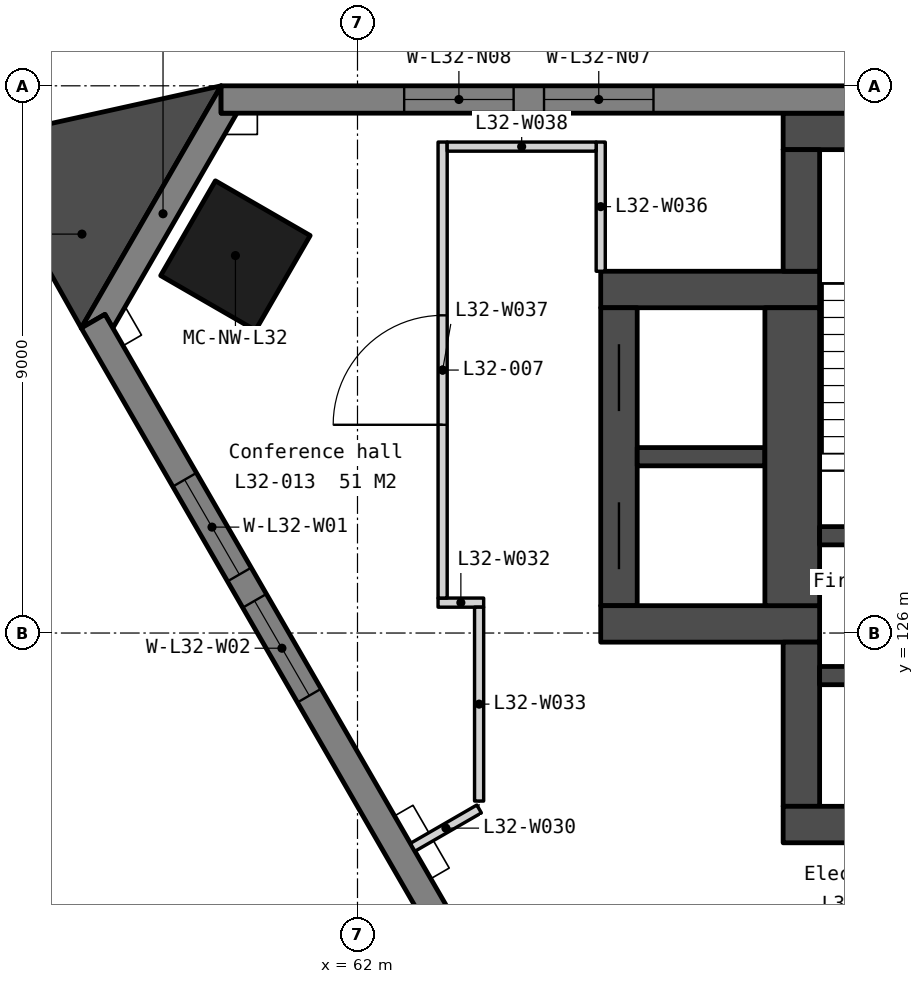
"""IFC4 building model, lengths in metres.
Left out: names, types, materials, properties, quantities, classifications, styles, units other than length and angle.
Written with IfcOpenShell. Run it as: python <this file> out.ifc"""

import sys

from ifc_helpers import new_model, si_unit, direction, frame, frame_2d, origin, origin_2d, place, context, subcontext, project, spatial, polyline, rectangle, outline, extrude, element, fill, save


model = new_model("IFC4")
c1 = context("Model", 3, precision=1e-05, world=origin(), true_north=direction((0.0, 1.0)))
c2 = subcontext(c1, "Body", "Model", "MODEL_VIEW")
j1 = project(units=[si_unit("LENGTHUNIT", "METRE"), si_unit("PLANEANGLEUNIT", "RADIAN")], contexts=[c1])
p1 = place(None, origin())
s1 = spatial("IfcSite", under=j1, at=p1, CompositionType="ELEMENT")
p2 = place(p1, origin())
s2 = spatial("IfcBuilding", under=s1, at=p2, CompositionType="ELEMENT")
p3 = place(p2, frame((0.0, 0.0, 128.6)))
s3 = spatial("IfcBuildingStorey", under=s2, at=p3, CompositionType="ELEMENT", Elevation=128.6)
p4 = place(p3, frame((59.993, 132.208, 0.0), z_axis=(0.0, 0.0, 1.0), x_axis=(-0.5, -0.866025403784, 0.0)))
e1 = element("IfcColumn", 1, at=p4, inside=s3, PredefinedType="COLUMN", context=c2, shape_type="SweptSolid", body=[
    extrude(rectangle(XDim=1.8, YDim=1.8, at=origin_2d()), origin(), (0.0, 0.0, 1.0), 3.9),
])
p5 = place(p3, frame((66.0, 131.65, 0.0), z_axis=(0.0, 0.0, 1.0), x_axis=(1.0, 0.0, 0.0)))
e2 = element("IfcWall", 2, at=p5, inside=s3, PredefinedType="SOLIDWALL", context=c2, shape_type="SweptSolid", body=[
    extrude(rectangle(XDim=3.6, YDim=0.6, at=frame_2d((1.8, 0.0))), origin(), (0.0, 0.0, 1.0), 3.75),
])
p6 = place(p3, frame((66.3, 131.35, 0.0), z_axis=(0.0, 0.0, 1.0), x_axis=(0.0, -1.0, 0.0)))
e3 = element("IfcWall", 3, at=p6, inside=s3, PredefinedType="SOLIDWALL", context=c2, shape_type="SweptSolid", body=[
    extrude(rectangle(XDim=4.9, YDim=0.6, at=frame_2d((2.45, 0.0))), origin(), (0.0, 0.0, 1.0), 3.75),
])
p7 = place(p6, frame((0.6, 0.0, 0.0)))
e4 = element("IfcOpeningElement", 4, at=p7, cuts=e3, PredefinedType="OPENING", context=c2, shape_type="SweptSolid", body=[
    extrude(rectangle(XDim=1.1, YDim=2.1, at=frame_2d((0.55, 1.05))), frame((0.0, 0.31, 0.0), z_axis=(0.0, -1.0, 0.0), x_axis=(1.0, 0.0, 0.0)), (0.0, 0.0, 1.0), 0.62),
])
p8 = place(p6, frame((3.2, 0.0, 0.0)))
e5 = element("IfcOpeningElement", 5, at=p8, cuts=e3, PredefinedType="OPENING", context=c2, shape_type="SweptSolid", body=[
    extrude(rectangle(XDim=1.1, YDim=2.1, at=frame_2d((0.55, 1.05))), frame((0.0, 0.31, 0.0), z_axis=(0.0, -1.0, 0.0), x_axis=(1.0, 0.0, 0.0)), (0.0, 0.0, 1.0), 0.62),
])
p9 = place(p3, frame((66.0, 126.15, 0.0), z_axis=(0.0, 0.0, 1.0), x_axis=(1.0, 0.0, 0.0)))
e6 = element("IfcWall", 6, at=p9, inside=s3, PredefinedType="SOLIDWALL", context=c2, shape_type="SweptSolid", body=[
    extrude(rectangle(XDim=3.6, YDim=0.6, at=frame_2d((1.8, 0.0))), origin(), (0.0, 0.0, 1.0), 3.75),
])
p10 = place(p3, frame((66.6, 128.9, 0.0), z_axis=(0.0, 0.0, 1.0), x_axis=(1.0, 0.0, 0.0)))
e7 = element("IfcWall", 7, at=p10, inside=s3, PredefinedType="SOLIDWALL", context=c2, shape_type="SweptSolid", body=[
    extrude(rectangle(XDim=2.1, YDim=0.3, at=frame_2d((1.05, 0.0))), origin(), (0.0, 0.0, 1.0), 3.75),
])
p11 = place(p3, frame((69.15, 131.35, 0.0), z_axis=(0.0, 0.0, 1.0), x_axis=(0.0, -1.0, 0.0)))
e8 = element("IfcWall", 8, at=p11, inside=s3, PredefinedType="SOLIDWALL", context=c2, shape_type="SweptSolid", body=[
    extrude(rectangle(XDim=4.9, YDim=0.9, at=frame_2d((2.45, 0.0))), origin(), (0.0, 0.0, 1.0), 3.75),
])
p12 = place(p3, frame((69.0, 134.25, 0.0), z_axis=(0.0, 0.0, 1.0), x_axis=(1.0, 0.0, 0.0)))
e9 = element("IfcWall", 9, at=p12, inside=s3, PredefinedType="SOLIDWALL", context=c2, shape_type="SweptSolid", body=[
    extrude(rectangle(XDim=22.0, YDim=0.6, at=frame_2d((11.0, 0.0))), origin(), (0.0, 0.0, 1.0), 3.75),
])
p13 = place(p3, frame((69.3, 133.95, 0.0), z_axis=(0.0, 0.0, 1.0), x_axis=(0.0, -1.0, 0.0)))
e10 = element("IfcWall", 10, at=p13, inside=s3, PredefinedType="SOLIDWALL", context=c2, shape_type="SweptSolid", body=[
    extrude(rectangle(XDim=2.0, YDim=0.6, at=frame_2d((1.0, 0.0))), origin(), (0.0, 0.0, 1.0), 3.75),
])
p14 = place(p3, frame((69.3, 125.85, 0.0), z_axis=(0.0, 0.0, 1.0), x_axis=(0.0, -1.0, 0.0)))
e11 = element("IfcWall", 11, at=p14, inside=s3, PredefinedType="SOLIDWALL", context=c2, shape_type="SweptSolid", body=[
    extrude(rectangle(XDim=2.7, YDim=0.6, at=frame_2d((1.35, 0.0))), origin(), (0.0, 0.0, 1.0), 3.75),
])
p15 = place(p3, frame((69.0, 122.85, 0.0), z_axis=(0.0, 0.0, 1.0), x_axis=(1.0, 0.0, 0.0)))
e12 = element("IfcWall", 12, at=p15, inside=s3, PredefinedType="SOLIDWALL", context=c2, shape_type="SweptSolid", body=[
    extrude(rectangle(XDim=22.0, YDim=0.6, at=frame_2d((11.0, 0.0))), origin(), (0.0, 0.0, 1.0), 3.75),
])
p16 = place(p15, frame((16.375, 0.0, 0.0)))
e13 = element("IfcOpeningElement", 13, at=p16, cuts=e12, PredefinedType="OPENING", context=c2, shape_type="SweptSolid", body=[
    extrude(rectangle(XDim=1.8, YDim=2.1, at=frame_2d((0.9, 1.05))), frame((0.0, 0.31, 0.0), z_axis=(0.0, -1.0, 0.0), x_axis=(1.0, 0.0, 0.0)), (0.0, 0.0, 1.0), 0.62),
])
p17 = place(p15, frame((3.825, 0.0, 0.0)))
e14 = element("IfcOpeningElement", 14, at=p17, cuts=e12, PredefinedType="OPENING", context=c2, shape_type="SweptSolid", body=[
    extrude(rectangle(XDim=1.8, YDim=2.1, at=frame_2d((0.9, 1.05))), frame((0.0, 0.31, 0.0), z_axis=(0.0, -1.0, 0.0), x_axis=(1.0, 0.0, 0.0)), (0.0, 0.0, 1.0), 0.62),
])
p18 = place(p15, frame((12.85, 0.0, 0.0)))
e15 = element("IfcOpeningElement", 15, at=p18, cuts=e12, PredefinedType="OPENING", context=c2, shape_type="SweptSolid", body=[
    extrude(rectangle(XDim=1.5, YDim=2.1, at=frame_2d((0.75, 1.05))), frame((0.0, 0.31, 0.0), z_axis=(0.0, -1.0, 0.0), x_axis=(1.0, 0.0, 0.0)), (0.0, 0.0, 1.0), 0.62),
])
for number, where, z_axis, x_axis in (
    (16, (69.6, 127.6, 0.0), (0.0, 0.0, 1.0), (1.0, 0.0, 0.0)),
    (17, (69.6, 125.3, 0.0), (0.0, 0.0, 1.0), (1.0, 0.0, 0.0)),
):
    element("IfcWall", number, at=place(p3, frame(where, z_axis=z_axis, x_axis=x_axis)), inside=s3, PredefinedType="SOLIDWALL", context=c2, shape_type="SweptSolid", body=[
        extrude(rectangle(XDim=2.55, YDim=0.3, at=frame_2d((1.275, 0.0))), origin(), (0.0, 0.0, 1.0), 3.75),
    ])
p19 = place(p3, frame((0.0, 0.0, -0.45)))
e18 = element("IfcWall", 18, at=p19, inside=s3, PredefinedType="SOLIDWALL", context=c2, shape_type="SweptSolid", body=[
    extrude(outline(polyline([(59.757, 135.0), (59.757, 134.55), (60.017, 134.55), (57.977, 131.016), (57.847, 131.241), (57.457, 131.016), (59.757, 135.0)])), origin(), (0.0, 0.0, 1.0), 4.2),
])
p20 = place(p3, frame((100.243, 134.775, -0.45), z_axis=(0.0, 0.0, 1.0), x_axis=(-1.0, 0.0, 0.0)))
e19 = element("IfcWall", 19, at=p20, inside=s3, PredefinedType="SOLIDWALL", context=c2, shape_type="SweptSolid", body=[
    extrude(outline(polyline([(40.486, 0.0), (40.486, 4.2), (0.0, 4.2), (0.0, 0.0), (40.486, 0.0)])), frame((0.0, 0.225, 0.0), z_axis=(0.0, -1.0, 0.0), x_axis=(1.0, 0.0, 0.0)), (0.0, 0.0, 1.0), 0.45),
])
p21 = place(p20, frame((3.011, 0.0, 1.25)))
e20 = element("IfcOpeningElement", 20, at=p21, cuts=e19, PredefinedType="OPENING", context=c2, shape_type="SweptSolid", body=[
    extrude(rectangle(XDim=1.8, YDim=2.2, at=frame_2d((0.9, 1.1))), frame((0.0, 0.235, 0.0), z_axis=(0.0, -1.0, 0.0), x_axis=(1.0, 0.0, 0.0)), (0.0, 0.0, 1.0), 0.47),
])
p22 = place(p20, frame((5.311, 0.0, 1.25)))
e21 = element("IfcOpeningElement", 21, at=p22, cuts=e19, PredefinedType="OPENING", context=c2, shape_type="SweptSolid", body=[
    extrude(rectangle(XDim=1.8, YDim=2.2, at=frame_2d((0.9, 1.1))), frame((0.0, 0.235, 0.0), z_axis=(0.0, -1.0, 0.0), x_axis=(1.0, 0.0, 0.0)), (0.0, 0.0, 1.0), 0.47),
])
p23 = place(p20, frame((13.132, 0.0, 1.25)))
e22 = element("IfcOpeningElement", 22, at=p23, cuts=e19, PredefinedType="OPENING", context=c2, shape_type="SweptSolid", body=[
    extrude(rectangle(XDim=1.8, YDim=2.2, at=frame_2d((0.9, 1.1))), frame((0.0, 0.235, 0.0), z_axis=(0.0, -1.0, 0.0), x_axis=(1.0, 0.0, 0.0)), (0.0, 0.0, 1.0), 0.47),
])
p24 = place(p20, frame((15.432, 0.0, 1.25)))
e23 = element("IfcOpeningElement", 23, at=p24, cuts=e19, PredefinedType="OPENING", context=c2, shape_type="SweptSolid", body=[
    extrude(rectangle(XDim=1.8, YDim=2.2, at=frame_2d((0.9, 1.1))), frame((0.0, 0.235, 0.0), z_axis=(0.0, -1.0, 0.0), x_axis=(1.0, 0.0, 0.0)), (0.0, 0.0, 1.0), 0.47),
])
p25 = place(p20, frame((23.254, 0.0, 1.25)))
e24 = element("IfcOpeningElement", 24, at=p25, cuts=e19, PredefinedType="OPENING", context=c2, shape_type="SweptSolid", body=[
    extrude(rectangle(XDim=1.8, YDim=2.2, at=frame_2d((0.9, 1.1))), frame((0.0, 0.235, 0.0), z_axis=(0.0, -1.0, 0.0), x_axis=(1.0, 0.0, 0.0)), (0.0, 0.0, 1.0), 0.47),
])
p26 = place(p20, frame((25.554, 0.0, 1.25)))
e25 = element("IfcOpeningElement", 25, at=p26, cuts=e19, PredefinedType="OPENING", context=c2, shape_type="SweptSolid", body=[
    extrude(rectangle(XDim=1.8, YDim=2.2, at=frame_2d((0.9, 1.1))), frame((0.0, 0.235, 0.0), z_axis=(0.0, -1.0, 0.0), x_axis=(1.0, 0.0, 0.0)), (0.0, 0.0, 1.0), 0.47),
])
p27 = place(p20, frame((33.375, 0.0, 1.25)))
e26 = element("IfcOpeningElement", 26, at=p27, cuts=e19, PredefinedType="OPENING", context=c2, shape_type="SweptSolid", body=[
    extrude(rectangle(XDim=1.8, YDim=2.2, at=frame_2d((0.9, 1.1))), frame((0.0, 0.235, 0.0), z_axis=(0.0, -1.0, 0.0), x_axis=(1.0, 0.0, 0.0)), (0.0, 0.0, 1.0), 0.47),
])
p28 = place(p20, frame((35.675, 0.0, 1.25)))
e27 = element("IfcOpeningElement", 27, at=p28, cuts=e19, PredefinedType="OPENING", context=c2, shape_type="SweptSolid", body=[
    extrude(rectangle(XDim=1.8, YDim=2.2, at=frame_2d((0.9, 1.1))), frame((0.0, 0.235, 0.0), z_axis=(0.0, -1.0, 0.0), x_axis=(1.0, 0.0, 0.0)), (0.0, 0.0, 1.0), 0.47),
])
p29 = place(p3, frame((57.652, 131.129, -0.45), z_axis=(0.0, 0.0, 1.0), x_axis=(0.499997369791, -0.866026922331, 0.0)))
e28 = element("IfcWall", 28, at=p29, inside=s3, PredefinedType="SOLIDWALL", context=c2, shape_type="SweptSolid", body=[
    extrude(outline(polyline([(40.486, 0.0), (40.486, 4.2), (0.0, 4.2), (0.0, 0.0), (40.486, 0.0)])), frame((0.0, 0.225, 0.0), z_axis=(0.0, -1.0, 0.0), x_axis=(1.0, 0.0, 0.0)), (0.0, 0.0, 1.0), 0.45),
])
p30 = place(p29, frame((3.011, 0.0, 1.25)))
e29 = element("IfcOpeningElement", 29, at=p30, cuts=e28, PredefinedType="OPENING", context=c2, shape_type="SweptSolid", body=[
    extrude(rectangle(XDim=1.8, YDim=2.2, at=frame_2d((0.9, 1.1))), frame((0.0, 0.235, 0.0), z_axis=(0.0, -1.0, 0.0), x_axis=(1.0, 0.0, 0.0)), (0.0, 0.0, 1.0), 0.47),
])
p31 = place(p29, frame((5.311, 0.0, 1.25)))
e30 = element("IfcOpeningElement", 30, at=p31, cuts=e28, PredefinedType="OPENING", context=c2, shape_type="SweptSolid", body=[
    extrude(rectangle(XDim=1.8, YDim=2.2, at=frame_2d((0.9, 1.1))), frame((0.0, 0.235, 0.0), z_axis=(0.0, -1.0, 0.0), x_axis=(1.0, 0.0, 0.0)), (0.0, 0.0, 1.0), 0.47),
])
p32 = place(p29, frame((13.132, 0.0, 1.25)))
e31 = element("IfcOpeningElement", 31, at=p32, cuts=e28, PredefinedType="OPENING", context=c2, shape_type="SweptSolid", body=[
    extrude(rectangle(XDim=1.8, YDim=2.2, at=frame_2d((0.9, 1.1))), frame((0.0, 0.235, 0.0), z_axis=(0.0, -1.0, 0.0), x_axis=(1.0, 0.0, 0.0)), (0.0, 0.0, 1.0), 0.47),
])
p33 = place(p29, frame((15.432, 0.0, 1.25)))
e32 = element("IfcOpeningElement", 32, at=p33, cuts=e28, PredefinedType="OPENING", context=c2, shape_type="SweptSolid", body=[
    extrude(rectangle(XDim=1.8, YDim=2.2, at=frame_2d((0.9, 1.1))), frame((0.0, 0.235, 0.0), z_axis=(0.0, -1.0, 0.0), x_axis=(1.0, 0.0, 0.0)), (0.0, 0.0, 1.0), 0.47),
])
p34 = place(p29, frame((23.254, 0.0, 1.25)))
e33 = element("IfcOpeningElement", 33, at=p34, cuts=e28, PredefinedType="OPENING", context=c2, shape_type="SweptSolid", body=[
    extrude(rectangle(XDim=1.8, YDim=2.2, at=frame_2d((0.9, 1.1))), frame((0.0, 0.235, 0.0), z_axis=(0.0, -1.0, 0.0), x_axis=(1.0, 0.0, 0.0)), (0.0, 0.0, 1.0), 0.47),
])
p35 = place(p29, frame((25.554, 0.0, 1.25)))
e34 = element("IfcOpeningElement", 34, at=p35, cuts=e28, PredefinedType="OPENING", context=c2, shape_type="SweptSolid", body=[
    extrude(rectangle(XDim=1.8, YDim=2.2, at=frame_2d((0.9, 1.1))), frame((0.0, 0.235, 0.0), z_axis=(0.0, -1.0, 0.0), x_axis=(1.0, 0.0, 0.0)), (0.0, 0.0, 1.0), 0.47),
])
p36 = place(p29, frame((33.375, 0.0, 1.25)))
e35 = element("IfcOpeningElement", 35, at=p36, cuts=e28, PredefinedType="OPENING", context=c2, shape_type="SweptSolid", body=[
    extrude(rectangle(XDim=1.8, YDim=2.2, at=frame_2d((0.9, 1.1))), frame((0.0, 0.235, 0.0), z_axis=(0.0, -1.0, 0.0), x_axis=(1.0, 0.0, 0.0)), (0.0, 0.0, 1.0), 0.47),
])
p37 = place(p29, frame((35.675, 0.0, 1.25)))
e36 = element("IfcOpeningElement", 36, at=p37, cuts=e28, PredefinedType="OPENING", context=c2, shape_type="SweptSolid", body=[
    extrude(rectangle(XDim=1.8, YDim=2.2, at=frame_2d((0.9, 1.1))), frame((0.0, 0.235, 0.0), z_axis=(0.0, -1.0, 0.0), x_axis=(1.0, 0.0, 0.0)), (0.0, 0.0, 1.0), 0.47),
])
p38 = place(p3, frame((0.0, 0.0, -0.45)))
e37 = element("IfcWall", 37, at=p38, inside=s3, PredefinedType="SOLIDWALL", context=c2, shape_type="SweptSolid", body=[
    extrude(outline(polyline([(59.757, 135.0), (55.72, 134.106), (57.457, 131.016), (59.757, 135.0)])), origin(), (0.0, 0.0, 1.0), 4.2),
])
p39 = place(p3, frame((62.907, 122.476, 0.0), z_axis=(0.0, 0.0, 1.0), x_axis=(0.865995441363, 0.500051892845, 0.0)))
e38 = element("IfcWall", 38, at=p39, inside=s3, PredefinedType="PARTITIONING", context=c2, shape_type="SweptSolid", body=[
    extrude(rectangle(XDim=1.261, YDim=0.15, at=frame_2d((0.631, 0.0))), origin(), (0.0, 0.0, 1.0), 3.75),
])
p40 = place(p3, frame((63.325, 126.5, 0.0), z_axis=(0.0, 0.0, 1.0), x_axis=(1.0, 0.0, 0.0)))
e39 = element("IfcWall", 39, at=p40, inside=s3, PredefinedType="PARTITIONING", context=c2, shape_type="SweptSolid", body=[
    extrude(rectangle(XDim=0.75, YDim=0.15, at=frame_2d((0.375, 0.0))), origin(), (0.0, 0.0, 1.0), 3.75),
])
p41 = place(p3, frame((64.0, 123.237, 0.0), z_axis=(0.0, 0.0, 1.0), x_axis=(0.0, 1.0, 0.0)))
e40 = element("IfcWall", 40, at=p41, inside=s3, PredefinedType="PARTITIONING", context=c2, shape_type="SweptSolid", body=[
    extrude(rectangle(XDim=3.188, YDim=0.15, at=frame_2d((1.594, 0.0))), origin(), (0.0, 0.0, 1.0), 3.75),
])
p42 = place(p3, frame((66.0, 131.95, 0.0), z_axis=(0.0, 0.0, 1.0), x_axis=(0.0, 1.0, 0.0)))
e41 = element("IfcWall", 41, at=p42, inside=s3, PredefinedType="PARTITIONING", context=c2, shape_type="SweptSolid", body=[
    extrude(rectangle(XDim=2.125, YDim=0.15, at=frame_2d((1.062, 0.0))), origin(), (0.0, 0.0, 1.0), 3.75),
])
p43 = place(p3, frame((63.4, 126.575, 0.0), z_axis=(0.0, 0.0, 1.0), x_axis=(0.0, 1.0, 0.0)))
e42 = element("IfcWall", 42, at=p43, inside=s3, PredefinedType="PARTITIONING", context=c2, shape_type="SweptSolid", body=[
    extrude(rectangle(XDim=7.5, YDim=0.15, at=frame_2d((3.75, 0.0))), origin(), (0.0, 0.0, 1.0), 3.75),
])
p44 = place(p43, frame((2.85, 0.0, 0.0)))
e43 = element("IfcOpeningElement", 43, at=p44, cuts=e42, PredefinedType="OPENING", context=c2, shape_type="SweptSolid", body=[
    extrude(rectangle(XDim=1.8, YDim=2.1, at=frame_2d((0.9, 1.05))), frame((0.0, 0.085, 0.0), z_axis=(0.0, -1.0, 0.0), x_axis=(1.0, 0.0, 0.0)), (0.0, 0.0, 1.0), 0.17),
])
p45 = place(p3, frame((63.475, 134.0, 0.0), z_axis=(0.0, 0.0, 1.0), x_axis=(1.0, 0.0, 0.0)))
e44 = element("IfcWall", 44, at=p45, inside=s3, PredefinedType="PARTITIONING", context=c2, shape_type="SweptSolid", body=[
    extrude(rectangle(XDim=2.45, YDim=0.15, at=frame_2d((1.225, 0.0))), origin(), (0.0, 0.0, 1.0), 3.207),
])
p46 = place(p7, origin())
e45 = element("IfcDoor", 45, at=p46, inside=s3, OperationType="SLIDING_TO_LEFT", PredefinedType="DOOR", context=c2, shape_type="SweptSolid", body=[
    extrude(rectangle(XDim=1.1, YDim=2.1, at=frame_2d((0.55, 1.05))), frame((0.0, 0.025, 0.0), z_axis=(0.0, -1.0, 0.0), x_axis=(1.0, 0.0, 0.0)), (0.0, 0.0, 1.0), 0.05),
])
fill(e4, e45)
p47 = place(p8, origin())
e46 = element("IfcDoor", 46, at=p47, inside=s3, OperationType="SLIDING_TO_LEFT", PredefinedType="DOOR", context=c2, shape_type="SweptSolid", body=[
    extrude(rectangle(XDim=1.1, YDim=2.1, at=frame_2d((0.55, 1.05))), frame((0.0, 0.025, 0.0), z_axis=(0.0, -1.0, 0.0), x_axis=(1.0, 0.0, 0.0)), (0.0, 0.0, 1.0), 0.05),
])
fill(e5, e46)
p48 = place(p27, origin())
e47 = element("IfcWindow", 47, at=p48, inside=s3, PartitioningType="SINGLE_PANEL", PredefinedType="WINDOW", context=c2, shape_type="SweptSolid", body=[
    extrude(rectangle(XDim=1.8, YDim=2.2, at=frame_2d((0.9, 1.1))), frame((0.0, 0.03, 0.0), z_axis=(0.0, -1.0, 0.0), x_axis=(1.0, 0.0, 0.0)), (0.0, 0.0, 1.0), 0.06),
])
fill(e26, e47)
p49 = place(p28, origin())
e48 = element("IfcWindow", 48, at=p49, inside=s3, PartitioningType="SINGLE_PANEL", PredefinedType="WINDOW", context=c2, shape_type="SweptSolid", body=[
    extrude(rectangle(XDim=1.8, YDim=2.2, at=frame_2d((0.9, 1.1))), frame((0.0, 0.03, 0.0), z_axis=(0.0, -1.0, 0.0), x_axis=(1.0, 0.0, 0.0)), (0.0, 0.0, 1.0), 0.06),
])
fill(e27, e48)
p50 = place(p30, origin())
e49 = element("IfcWindow", 49, at=p50, inside=s3, PartitioningType="SINGLE_PANEL", PredefinedType="WINDOW", context=c2, shape_type="SweptSolid", body=[
    extrude(rectangle(XDim=1.8, YDim=2.2, at=frame_2d((0.9, 1.1))), frame((0.0, 0.03, 0.0), z_axis=(0.0, -1.0, 0.0), x_axis=(1.0, 0.0, 0.0)), (0.0, 0.0, 1.0), 0.06),
])
fill(e29, e49)
p51 = place(p31, origin())
e50 = element("IfcWindow", 50, at=p51, inside=s3, PartitioningType="SINGLE_PANEL", PredefinedType="WINDOW", context=c2, shape_type="SweptSolid", body=[
    extrude(rectangle(XDim=1.8, YDim=2.2, at=frame_2d((0.9, 1.1))), frame((0.0, 0.03, 0.0), z_axis=(0.0, -1.0, 0.0), x_axis=(1.0, 0.0, 0.0)), (0.0, 0.0, 1.0), 0.06),
])
fill(e30, e50)
p52 = place(p44, origin())
e51 = element("IfcDoor", 51, at=p52, inside=s3, OperationType="SINGLE_SWING_LEFT", PredefinedType="DOOR", context=c2, shape_type="SweptSolid", body=[
    extrude(rectangle(XDim=1.8, YDim=2.1, at=frame_2d((0.9, 1.05))), frame((0.0, 0.025, 0.0), z_axis=(0.0, -1.0, 0.0), x_axis=(1.0, 0.0, 0.0)), (0.0, 0.0, 1.0), 0.05),
])
fill(e43, e51)
save(model, sys.argv[1])
